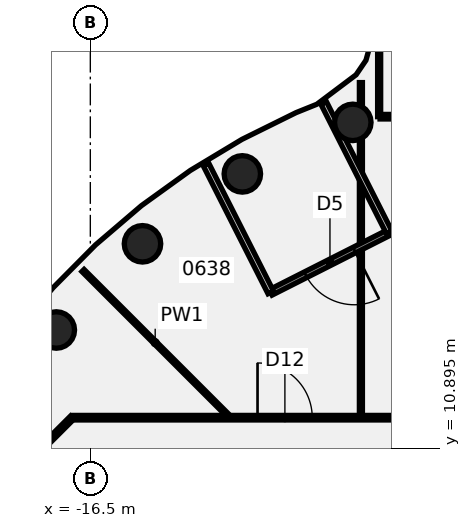
"""IFC4 building model, lengths in metres.
Left out: names, types, materials, properties, quantities, classifications, styles, units other than length and angle.
Written with IfcOpenShell. Run it as: python <this file> out.ifc"""

import sys

from ifc_helpers import new_model, si_unit, direction, frame, frame_2d, origin, origin_2d, place, context, subcontext, project, spatial, rectangle, circle, extrude, element, fill, save


model = new_model("IFC4")
c1 = context("Model", 3, precision=1e-05, world=origin(), true_north=direction((0.0, 1.0)))
c2 = subcontext(c1, "Body", "Model", "MODEL_VIEW")
j1 = project(units=[si_unit("LENGTHUNIT", "METRE"), si_unit("PLANEANGLEUNIT", "RADIAN")], contexts=[c1])
p1 = place(None, origin())
s1 = spatial("IfcSite", under=j1, at=p1, CompositionType="ELEMENT")
p2 = place(p1, origin())
s2 = spatial("IfcBuilding", under=s1, at=p2, CompositionType="ELEMENT")
p3 = place(p2, frame((0.0, 0.0, 34.0)))
s3 = spatial("IfcBuildingStorey", under=s2, at=p3, CompositionType="ELEMENT", Elevation=34.0)
for number, where, z_axis, x_axis in (
    (1, (-7.866, 21.613, -0.14), (0.0, 0.0, 1.0), (1.0, 0.0, 0.0)),
    (2, (-11.5, 19.919, -0.14), (0.0, 0.0, 1.0), (1.0, 0.0, 0.0)),
    (3, (-14.784, 17.619, -0.14), (0.0, 0.0, 1.0), (1.0, 0.0, 0.0)),
    (4, (-17.619, 14.784, -0.14), (0.0, 0.0, 1.0), (1.0, 0.0, 0.0)),
):
    element("IfcColumn", number, at=place(p3, frame(where, z_axis=z_axis, x_axis=x_axis)), inside=s3, PredefinedType="COLUMN", context=c2, shape_type="SweptSolid", body=[
        extrude(circle(Radius=0.6, at=origin_2d()), origin(), (0.0, 0.0, 1.0), 3.75),
    ])
p4 = place(p3, frame((-16.74, 16.74, 0.0), z_axis=(0.0, 0.0, 1.0), x_axis=(0.707106781187, -0.707106781187, 0.0)))
e5 = element("IfcWall", 5, at=p4, inside=s3, PredefinedType="PARTITIONING", context=c2, shape_type="SweptSolid", body=[
    extrude(rectangle(XDim=6.715, YDim=0.1, at=frame_2d((3.358, 0.0))), origin(), (0.0, 0.0, 1.0), 3.01),
])
p5 = place(p3, frame((-17.065, 11.9, 0.0), z_axis=(0.0, 0.0, 1.0), x_axis=(1.0, 0.0, 0.0)))
e6 = element("IfcWall", 6, at=p5, inside=s3, PredefinedType="PARTITIONING", context=c2, shape_type="SweptSolid", body=[
    extrude(rectangle(XDim=34.165, YDim=0.15, at=frame_2d((17.083, 0.0))), origin(), (0.0, 0.0, 1.0), 3.01),
])
p6 = place(p5, frame((16.215, 0.0, 0.0)))
e7 = element("IfcOpeningElement", 7, at=p6, cuts=e6, PredefinedType="OPENING", context=c2, shape_type="SweptSolid", body=[
    extrude(rectangle(XDim=1.8, YDim=2.1, at=frame_2d((0.9, 1.05))), frame((0.0, 0.085, 0.0), z_axis=(0.0, -1.0, 0.0), x_axis=(1.0, 0.0, 0.0)), (0.0, 0.0, 1.0), 0.17),
])
p7 = place(p5, frame((31.065, 0.0, 0.0)))
e8 = element("IfcOpeningElement", 8, at=p7, cuts=e6, PredefinedType="OPENING", context=c2, shape_type="SweptSolid", body=[
    extrude(rectangle(XDim=1.8, YDim=2.1, at=frame_2d((0.9, 1.05))), frame((0.0, 0.085, 0.0), z_axis=(0.0, -1.0, 0.0), x_axis=(1.0, 0.0, 0.0)), (0.0, 0.0, 1.0), 0.17),
])
p8 = place(p5, frame((6.065, 0.0, 0.0)))
e9 = element("IfcOpeningElement", 9, at=p8, cuts=e6, PredefinedType="OPENING", context=c2, shape_type="SweptSolid", body=[
    extrude(rectangle(XDim=1.8, YDim=2.1, at=frame_2d((0.9, 1.05))), frame((0.0, 0.085, 0.0), z_axis=(0.0, -1.0, 0.0), x_axis=(1.0, 0.0, 0.0)), (0.0, 0.0, 1.0), 0.17),
])
p9 = place(p3, frame((-6.97, 21.8, 0.0), z_axis=(0.0, 0.0, 1.0), x_axis=(1.0, 0.0, 0.0)))
e10 = element("IfcWall", 10, at=p9, inside=s3, PredefinedType="PARTITIONING", context=c2, shape_type="SweptSolid", body=[
    extrude(rectangle(XDim=3.81, YDim=0.15, at=frame_2d((1.905, 0.0))), origin(), (0.0, 0.0, 1.0), 3.01),
])
p10 = place(p9, frame((1.32, 0.0, 0.0)))
e11 = element("IfcOpeningElement", 11, at=p10, cuts=e10, PredefinedType="OPENING", context=c2, shape_type="SweptSolid", body=[
    extrude(rectangle(XDim=0.9, YDim=2.1, at=frame_2d((0.45, 1.05))), frame((0.0, 0.085, 0.0), z_axis=(0.0, -1.0, 0.0), x_axis=(1.0, 0.0, 0.0)), (0.0, 0.0, 1.0), 0.17),
])
p11 = place(p3, frame((-18.872, 10.128, 0.0), z_axis=(0.0, 0.0, 1.0), x_axis=(0.707106781187, 0.707106781187, 0.0)))
e12 = element("IfcWall", 12, at=p11, inside=s3, PredefinedType="PARTITIONING", context=c2, shape_type="SweptSolid", body=[
    extrude(rectangle(XDim=2.505, YDim=0.15, at=frame_2d((1.253, 0.0))), origin(), (0.0, 0.0, 1.0), 3.01),
])
p12 = place(p3, frame((-7.6, 11.955, 0.0), z_axis=(0.0, 0.0, 1.0), x_axis=(0.0, 1.0, 0.0)))
e13 = element("IfcWall", 13, at=p12, inside=s3, PredefinedType="PARTITIONING", context=c2, shape_type="SweptSolid", body=[
    extrude(rectangle(XDim=9.119, YDim=0.1, at=frame_2d((4.56, 0.0))), origin(), (0.0, 0.0, 1.0), 3.01),
])
p13 = place(p3, frame((-7.6, 22.152, 0.0), z_axis=(0.0, 0.0, 1.0), x_axis=(0.0, 1.0, 0.0)))
e14 = element("IfcWall", 14, at=p13, inside=s3, PredefinedType="PARTITIONING", context=c2, shape_type="SweptSolid", body=[
    extrude(rectangle(XDim=0.77, YDim=0.1, at=frame_2d((0.385, 0.0))), origin(), (0.0, 0.0, 1.0), 3.01),
])
p14 = place(p3, frame((-7.0, 21.8, 0.0), z_axis=(0.0, 0.0, 1.0), x_axis=(0.0, 1.0, 0.0)))
e15 = element("IfcWall", 15, at=p14, inside=s3, PredefinedType="PARTITIONING", context=c2, shape_type="SweptSolid", body=[
    extrude(rectangle(XDim=2.292, YDim=0.1, at=frame_2d((1.146, 0.0))), origin(), (0.0, 0.0, 1.0), 3.01),
])
p15 = place(p3, frame((-6.67, 17.994, 0.0), z_axis=(0.0, 0.0, 1.0), x_axis=(-0.892213621069, -0.451613611818, 0.0)))
e16 = element("IfcWall", 16, at=p15, inside=s3, PredefinedType="SOLIDWALL", context=c2, shape_type="SweptSolid", body=[
    extrude(rectangle(XDim=4.367, YDim=0.2, at=frame_2d((2.184, 0.0))), origin(), (0.0, 0.0, 1.0), 3.014),
])
p16 = place(p15, frame((1.283, 0.0, 0.0)))
e17 = element("IfcOpeningElement", 17, at=p16, cuts=e16, PredefinedType="OPENING", context=c2, shape_type="SweptSolid", body=[
    extrude(rectangle(XDim=1.8, YDim=2.4, at=frame_2d((0.9, 1.2))), frame((0.0, 0.11, 0.0), z_axis=(0.0, -1.0, 0.0), x_axis=(1.0, 0.0, 0.0)), (0.0, 0.0, 1.0), 0.22),
])
p17 = place(p3, frame((-6.669, 17.994, 0.0), z_axis=(0.0, 0.0, 1.0), x_axis=(-0.451625718362, 0.892207492971, 0.0)))
e18 = element("IfcWall", 18, at=p17, inside=s3, PredefinedType="SOLIDWALL", context=c2, shape_type="SweptSolid", body=[
    extrude(rectangle(XDim=4.775, YDim=0.2, at=frame_2d((2.387, 0.0))), origin(), (0.0, 0.0, 1.0), 3.014),
])
p18 = place(p3, frame((-10.566, 16.021, 0.0), z_axis=(0.0, 0.0, 1.0), x_axis=(-0.451621797864, 0.892209477474, 0.0)))
e19 = element("IfcWall", 19, at=p18, inside=s3, PredefinedType="SOLIDWALL", context=c2, shape_type="SweptSolid", body=[
    extrude(rectangle(XDim=4.713, YDim=0.2, at=frame_2d((2.356, 0.0))), origin(), (0.0, 0.0, 1.0), 3.61),
])
p19 = place(p8, origin())
e20 = element("IfcDoor", 20, at=p19, inside=s3, OperationType="DOUBLE_DOOR_SINGLE_SWING", PredefinedType="DOOR", context=c2, shape_type="SweptSolid", body=[
    extrude(rectangle(XDim=1.8, YDim=2.1, at=frame_2d((0.9, 1.05))), frame((0.0, 0.025, 0.0), z_axis=(0.0, -1.0, 0.0), x_axis=(1.0, 0.0, 0.0)), (0.0, 0.0, 1.0), 0.05),
])
fill(e9, e20)
p20 = place(p16, origin())
e21 = element("IfcDoor", 21, at=p20, inside=s3, OperationType="SINGLE_SWING_LEFT", PredefinedType="DOOR", context=c2, shape_type="SweptSolid", body=[
    extrude(rectangle(XDim=1.8, YDim=2.4, at=frame_2d((0.9, 1.2))), frame((0.0, 0.025, 0.0), z_axis=(0.0, -1.0, 0.0), x_axis=(1.0, 0.0, 0.0)), (0.0, 0.0, 1.0), 0.05),
])
fill(e17, e21)
save(model, sys.argv[1])
